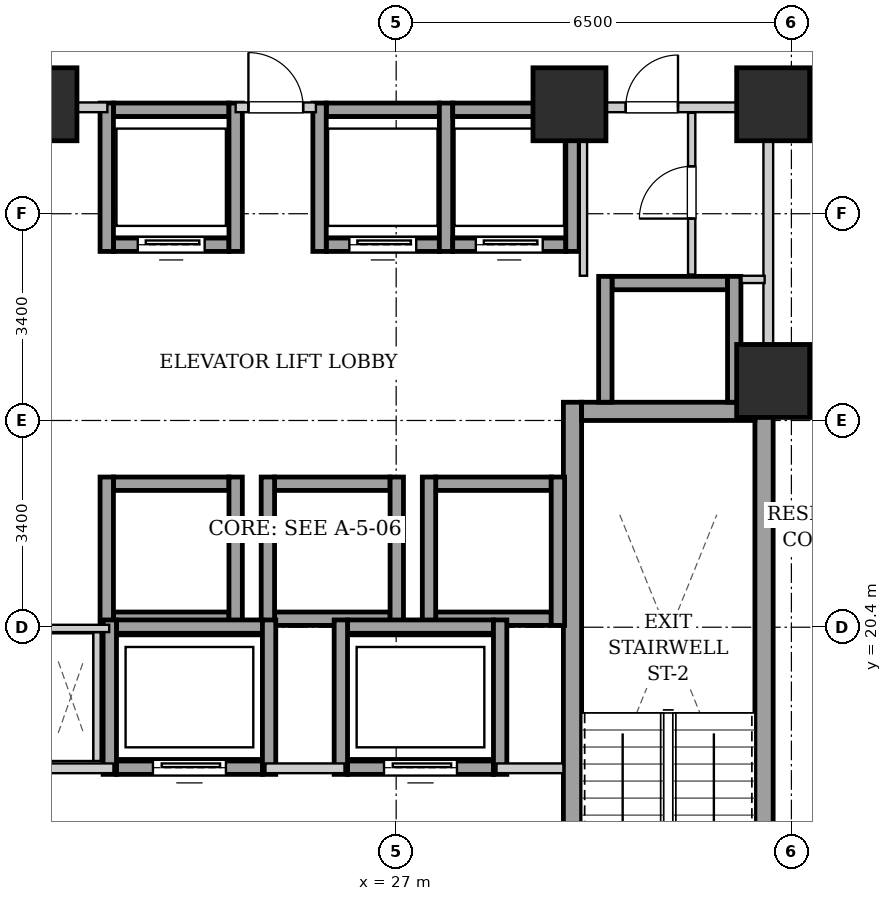
"""IFC4 building model, lengths in metres.
Left out: names, types, materials, properties, quantities, classifications, styles, units other than length and angle.
Written with IfcOpenShell. Run it as: python <this file> out.ifc"""

import sys

from ifc_helpers import new_model, si_unit, direction, frame, frame_2d, origin, origin_2d, place, context, subcontext, project, spatial, rectangle, extrude, element, fill, save


model = new_model("IFC4")
c1 = context("Model", 3, precision=1e-05, world=origin(), true_north=direction((0.0, 1.0)))
c2 = subcontext(c1, "Body", "Model", "MODEL_VIEW")
j1 = project(units=[si_unit("LENGTHUNIT", "METRE"), si_unit("PLANEANGLEUNIT", "RADIAN")], contexts=[c1])
p1 = place(None, origin())
s1 = spatial("IfcSite", under=j1, at=p1, CompositionType="ELEMENT")
p2 = place(p1, origin())
s2 = spatial("IfcBuilding", under=s1, at=p2, CompositionType="ELEMENT")
p3 = place(p2, frame((0.0, 0.0, 54.6)))
s3 = spatial("IfcBuildingStorey", under=s2, at=p3, CompositionType="ELEMENT", Elevation=54.6)
for number, where, z_axis, x_axis in (
    (1, (21.15, 29.0, 0.0), (0.0, 0.0, 1.0), (1.0, 0.0, 0.0)),
    (2, (29.85, 29.0, 0.0), (0.0, 0.0, 1.0), (1.0, 0.0, 0.0)),
    (3, (33.2, 29.0, 0.0), (0.0, 0.0, 1.0), (1.0, 0.0, 0.0)),
    (4, (33.2, 24.45, 0.0), (0.0, 0.0, 1.0), (1.0, 0.0, 0.0)),
):
    element("IfcColumn", number, at=place(p3, frame(where, z_axis=z_axis, x_axis=x_axis)), inside=s3, PredefinedType="COLUMN", context=c2, shape_type="SweptSolid", body=[
        extrude(rectangle(XDim=1.2, YDim=1.2, at=origin_2d()), origin(), (0.0, 0.0, 1.0), 3.2),
    ])
for number, where, z_axis, x_axis in (
    (5, (29.9, 15.1, 0.0), (0.0, 0.0, 1.0), (0.0, 1.0, 0.0)),
    (6, (33.05, 15.1, 0.0), (0.0, 0.0, 1.0), (0.0, 1.0, 0.0)),
):
    element("IfcWall", number, at=place(p3, frame(where, z_axis=z_axis, x_axis=x_axis)), inside=s3, PredefinedType="SHEAR", context=c2, shape_type="SweptSolid", body=[
        extrude(rectangle(XDim=9.0, YDim=0.3, at=frame_2d((4.5, 0.0))), origin(), (0.0, 0.0, 1.0), 2.94),
    ])
p4 = place(p3, frame((30.05, 23.95, 0.0), z_axis=(0.0, 0.0, 1.0), x_axis=(1.0, 0.0, 0.0)))
e7 = element("IfcWall", 7, at=p4, inside=s3, PredefinedType="SHEAR", context=c2, shape_type="SweptSolid", body=[
    extrude(rectangle(XDim=2.85, YDim=0.3, at=frame_2d((1.425, 0.0))), origin(), (0.0, 0.0, 1.0), 2.94),
])
p5 = place(p3, frame((22.35, 26.69, 0.0), z_axis=(0.0, 0.0, 1.0), x_axis=(1.0, 0.0, 0.0)))
e8 = element("IfcWall", 8, at=p5, inside=s3, PredefinedType="SHEAR", context=c2, shape_type="SweptSolid", body=[
    extrude(rectangle(XDim=1.9, YDim=0.22, at=frame_2d((0.95, 0.0))), origin(), (0.0, 0.0, 1.0), 2.94),
])
p6 = place(p5, frame((0.4, 0.0, 0.0)))
e9 = element("IfcOpeningElement", 9, at=p6, cuts=e8, PredefinedType="OPENING", context=c2, shape_type="SweptSolid", body=[
    extrude(rectangle(XDim=1.1, YDim=2.15, at=frame_2d((0.55, 1.075))), frame((0.0, 0.12, 0.0), z_axis=(0.0, -1.0, 0.0), x_axis=(1.0, 0.0, 0.0)), (0.0, 0.0, 1.0), 0.24),
])
p7 = place(p3, frame((22.35, 28.91, 0.0), z_axis=(0.0, 0.0, 1.0), x_axis=(1.0, 0.0, 0.0)))
e10 = element("IfcWall", 10, at=p7, inside=s3, PredefinedType="SHEAR", context=c2, shape_type="SweptSolid", body=[
    extrude(rectangle(XDim=1.9, YDim=0.22, at=frame_2d((0.95, 0.0))), origin(), (0.0, 0.0, 1.0), 2.94),
])
for number, where, z_axis, x_axis in (
    (11, (22.24, 26.58, 0.0), (0.0, 0.0, 1.0), (0.0, 1.0, 0.0)),
    (12, (24.36, 26.58, 0.0), (0.0, 0.0, 1.0), (0.0, 1.0, 0.0)),
):
    element("IfcWall", number, at=place(p3, frame(where, z_axis=z_axis, x_axis=x_axis)), inside=s3, PredefinedType="SHEAR", context=c2, shape_type="SweptSolid", body=[
        extrude(rectangle(XDim=2.44, YDim=0.22, at=frame_2d((1.22, 0.0))), origin(), (0.0, 0.0, 1.0), 2.94),
    ])
p8 = place(p3, frame((25.85, 26.69, 0.0), z_axis=(0.0, 0.0, 1.0), x_axis=(1.0, 0.0, 0.0)))
e13 = element("IfcWall", 13, at=p8, inside=s3, PredefinedType="SHEAR", context=c2, shape_type="SweptSolid", body=[
    extrude(rectangle(XDim=1.86, YDim=0.22, at=frame_2d((0.93, 0.0))), origin(), (0.0, 0.0, 1.0), 2.94),
])
p9 = place(p8, frame((0.38, 0.0, 0.0)))
e14 = element("IfcOpeningElement", 14, at=p9, cuts=e13, PredefinedType="OPENING", context=c2, shape_type="SweptSolid", body=[
    extrude(rectangle(XDim=1.1, YDim=2.15, at=frame_2d((0.55, 1.075))), frame((0.0, 0.12, 0.0), z_axis=(0.0, -1.0, 0.0), x_axis=(1.0, 0.0, 0.0)), (0.0, 0.0, 1.0), 0.24),
])
p10 = place(p3, frame((25.85, 28.91, 0.0), z_axis=(0.0, 0.0, 1.0), x_axis=(1.0, 0.0, 0.0)))
e15 = element("IfcWall", 15, at=p10, inside=s3, PredefinedType="SHEAR", context=c2, shape_type="SweptSolid", body=[
    extrude(rectangle(XDim=1.86, YDim=0.22, at=frame_2d((0.93, 0.0))), origin(), (0.0, 0.0, 1.0), 2.94),
])
for number, where, z_axis, x_axis in (
    (16, (25.74, 26.58, 0.0), (0.0, 0.0, 1.0), (0.0, 1.0, 0.0)),
    (17, (27.82, 26.58, 0.0), (0.0, 0.0, 1.0), (0.0, 1.0, 0.0)),
):
    element("IfcWall", number, at=place(p3, frame(where, z_axis=z_axis, x_axis=x_axis)), inside=s3, PredefinedType="SHEAR", context=c2, shape_type="SweptSolid", body=[
        extrude(rectangle(XDim=2.44, YDim=0.22, at=frame_2d((1.22, 0.0))), origin(), (0.0, 0.0, 1.0), 2.94),
    ])
p11 = place(p3, frame((27.93, 26.69, 0.0), z_axis=(0.0, 0.0, 1.0), x_axis=(1.0, 0.0, 0.0)))
e18 = element("IfcWall", 18, at=p11, inside=s3, PredefinedType="SHEAR", context=c2, shape_type="SweptSolid", body=[
    extrude(rectangle(XDim=1.86, YDim=0.22, at=frame_2d((0.93, 0.0))), origin(), (0.0, 0.0, 1.0), 2.94),
])
p12 = place(p11, frame((0.38, 0.0, 0.0)))
e19 = element("IfcOpeningElement", 19, at=p12, cuts=e18, PredefinedType="OPENING", context=c2, shape_type="SweptSolid", body=[
    extrude(rectangle(XDim=1.1, YDim=2.15, at=frame_2d((0.55, 1.075))), frame((0.0, 0.12, 0.0), z_axis=(0.0, -1.0, 0.0), x_axis=(1.0, 0.0, 0.0)), (0.0, 0.0, 1.0), 0.24),
])
p13 = place(p3, frame((27.93, 28.91, 0.0), z_axis=(0.0, 0.0, 1.0), x_axis=(1.0, 0.0, 0.0)))
e20 = element("IfcWall", 20, at=p13, inside=s3, PredefinedType="SHEAR", context=c2, shape_type="SweptSolid", body=[
    extrude(rectangle(XDim=1.86, YDim=0.22, at=frame_2d((0.93, 0.0))), origin(), (0.0, 0.0, 1.0), 2.94),
])
p14 = place(p3, frame((29.9, 26.58, 0.0), z_axis=(0.0, 0.0, 1.0), x_axis=(0.0, 1.0, 0.0)))
e21 = element("IfcWall", 21, at=p14, inside=s3, PredefinedType="SHEAR", context=c2, shape_type="SweptSolid", body=[
    extrude(rectangle(XDim=2.44, YDim=0.22, at=frame_2d((1.22, 0.0))), origin(), (0.0, 0.0, 1.0), 2.94),
])
for number, where, z_axis, x_axis in (
    (22, (22.35, 20.54, 0.0), (0.0, 0.0, 1.0), (1.0, 0.0, 0.0)),
    (23, (22.35, 22.76, 0.0), (0.0, 0.0, 1.0), (1.0, 0.0, 0.0)),
):
    element("IfcWall", number, at=place(p3, frame(where, z_axis=z_axis, x_axis=x_axis)), inside=s3, PredefinedType="SHEAR", context=c2, shape_type="SweptSolid", body=[
        extrude(rectangle(XDim=1.9, YDim=0.22, at=frame_2d((0.95, 0.0))), origin(), (0.0, 0.0, 1.0), 2.94),
    ])
for number, where, z_axis, x_axis in (
    (24, (22.24, 20.43, 0.0), (0.0, 0.0, 1.0), (0.0, 1.0, 0.0)),
    (25, (24.36, 20.43, 0.0), (0.0, 0.0, 1.0), (0.0, 1.0, 0.0)),
):
    element("IfcWall", number, at=place(p3, frame(where, z_axis=z_axis, x_axis=x_axis)), inside=s3, PredefinedType="SHEAR", context=c2, shape_type="SweptSolid", body=[
        extrude(rectangle(XDim=2.44, YDim=0.22, at=frame_2d((1.22, 0.0))), origin(), (0.0, 0.0, 1.0), 2.94),
    ])
for number, where, z_axis, x_axis in (
    (26, (25.0, 20.54, 0.0), (0.0, 0.0, 1.0), (1.0, 0.0, 0.0)),
    (27, (25.0, 22.76, 0.0), (0.0, 0.0, 1.0), (1.0, 0.0, 0.0)),
):
    element("IfcWall", number, at=place(p3, frame(where, z_axis=z_axis, x_axis=x_axis)), inside=s3, PredefinedType="SHEAR", context=c2, shape_type="SweptSolid", body=[
        extrude(rectangle(XDim=1.9, YDim=0.22, at=frame_2d((0.95, 0.0))), origin(), (0.0, 0.0, 1.0), 2.94),
    ])
for number, where, z_axis, x_axis in (
    (28, (24.89, 20.43, 0.0), (0.0, 0.0, 1.0), (0.0, 1.0, 0.0)),
    (29, (27.01, 20.43, 0.0), (0.0, 0.0, 1.0), (0.0, 1.0, 0.0)),
):
    element("IfcWall", number, at=place(p3, frame(where, z_axis=z_axis, x_axis=x_axis)), inside=s3, PredefinedType="SHEAR", context=c2, shape_type="SweptSolid", body=[
        extrude(rectangle(XDim=2.44, YDim=0.22, at=frame_2d((1.22, 0.0))), origin(), (0.0, 0.0, 1.0), 2.94),
    ])
for number, where, z_axis, x_axis in (
    (30, (27.65, 20.54, 0.0), (0.0, 0.0, 1.0), (1.0, 0.0, 0.0)),
    (31, (27.65, 22.76, 0.0), (0.0, 0.0, 1.0), (1.0, 0.0, 0.0)),
):
    element("IfcWall", number, at=place(p3, frame(where, z_axis=z_axis, x_axis=x_axis)), inside=s3, PredefinedType="SHEAR", context=c2, shape_type="SweptSolid", body=[
        extrude(rectangle(XDim=1.9, YDim=0.22, at=frame_2d((0.95, 0.0))), origin(), (0.0, 0.0, 1.0), 2.94),
    ])
for number, where, z_axis, x_axis in (
    (32, (27.54, 20.43, 0.0), (0.0, 0.0, 1.0), (0.0, 1.0, 0.0)),
    (33, (29.66, 20.43, 0.0), (0.0, 0.0, 1.0), (0.0, 1.0, 0.0)),
):
    element("IfcWall", number, at=place(p3, frame(where, z_axis=z_axis, x_axis=x_axis)), inside=s3, PredefinedType="SHEAR", context=c2, shape_type="SweptSolid", body=[
        extrude(rectangle(XDim=2.44, YDim=0.22, at=frame_2d((1.22, 0.0))), origin(), (0.0, 0.0, 1.0), 2.94),
    ])
p15 = place(p3, frame((30.55, 26.06, 0.0), z_axis=(0.0, 0.0, 1.0), x_axis=(1.0, 0.0, 0.0)))
e34 = element("IfcWall", 34, at=p15, inside=s3, PredefinedType="SHEAR", context=c2, shape_type="SweptSolid", body=[
    extrude(rectangle(XDim=1.9, YDim=0.22, at=frame_2d((0.95, 0.0))), origin(), (0.0, 0.0, 1.0), 2.94),
])
for number, where, z_axis, x_axis in (
    (35, (30.44, 24.1, 0.0), (0.0, 0.0, 1.0), (0.0, 1.0, 0.0)),
    (36, (32.56, 24.1, 0.0), (0.0, 0.0, 1.0), (0.0, 1.0, 0.0)),
):
    element("IfcWall", number, at=place(p3, frame(where, z_axis=z_axis, x_axis=x_axis)), inside=s3, PredefinedType="SHEAR", context=c2, shape_type="SweptSolid", body=[
        extrude(rectangle(XDim=2.07, YDim=0.22, at=frame_2d((1.035, 0.0))), origin(), (0.0, 0.0, 1.0), 2.94),
    ])
p16 = place(p3, frame((22.4, 18.09, 0.0), z_axis=(0.0, 0.0, 1.0), x_axis=(1.0, 0.0, 0.0)))
e37 = element("IfcWall", 37, at=p16, inside=s3, PredefinedType="SHEAR", context=c2, shape_type="SweptSolid", body=[
    extrude(rectangle(XDim=2.4, YDim=0.22, at=frame_2d((1.2, 0.0))), origin(), (0.0, 0.0, 1.0), 2.94),
])
p17 = place(p16, frame((0.6, 0.0, 0.0)))
e38 = element("IfcOpeningElement", 38, at=p17, cuts=e37, PredefinedType="OPENING", context=c2, shape_type="SweptSolid", body=[
    extrude(rectangle(XDim=1.2, YDim=2.15, at=frame_2d((0.6, 1.075))), frame((0.0, 0.12, 0.0), z_axis=(0.0, -1.0, 0.0), x_axis=(1.0, 0.0, 0.0)), (0.0, 0.0, 1.0), 0.24),
])
p18 = place(p3, frame((22.4, 20.41, 0.0), z_axis=(0.0, 0.0, 1.0), x_axis=(1.0, 0.0, 0.0)))
e39 = element("IfcWall", 39, at=p18, inside=s3, PredefinedType="SHEAR", context=c2, shape_type="SweptSolid", body=[
    extrude(rectangle(XDim=2.4, YDim=0.22, at=frame_2d((1.2, 0.0))), origin(), (0.0, 0.0, 1.0), 2.94),
])
for number, where, z_axis, x_axis in (
    (40, (22.29, 17.98, 0.0), (0.0, 0.0, 1.0), (0.0, 1.0, 0.0)),
    (41, (24.91, 17.98, 0.0), (0.0, 0.0, 1.0), (0.0, 1.0, 0.0)),
):
    element("IfcWall", number, at=place(p3, frame(where, z_axis=z_axis, x_axis=x_axis)), inside=s3, PredefinedType="SHEAR", context=c2, shape_type="SweptSolid", body=[
        extrude(rectangle(XDim=2.54, YDim=0.22, at=frame_2d((1.27, 0.0))), origin(), (0.0, 0.0, 1.0), 2.94),
    ])
p19 = place(p3, frame((26.2, 18.09, 0.0), z_axis=(0.0, 0.0, 1.0), x_axis=(1.0, 0.0, 0.0)))
e42 = element("IfcWall", 42, at=p19, inside=s3, PredefinedType="SHEAR", context=c2, shape_type="SweptSolid", body=[
    extrude(rectangle(XDim=2.4, YDim=0.22, at=frame_2d((1.2, 0.0))), origin(), (0.0, 0.0, 1.0), 2.94),
])
p20 = place(p19, frame((0.6, 0.0, 0.0)))
e43 = element("IfcOpeningElement", 43, at=p20, cuts=e42, PredefinedType="OPENING", context=c2, shape_type="SweptSolid", body=[
    extrude(rectangle(XDim=1.2, YDim=2.15, at=frame_2d((0.6, 1.075))), frame((0.0, 0.12, 0.0), z_axis=(0.0, -1.0, 0.0), x_axis=(1.0, 0.0, 0.0)), (0.0, 0.0, 1.0), 0.24),
])
p21 = place(p3, frame((26.2, 20.41, 0.0), z_axis=(0.0, 0.0, 1.0), x_axis=(1.0, 0.0, 0.0)))
e44 = element("IfcWall", 44, at=p21, inside=s3, PredefinedType="SHEAR", context=c2, shape_type="SweptSolid", body=[
    extrude(rectangle(XDim=2.4, YDim=0.22, at=frame_2d((1.2, 0.0))), origin(), (0.0, 0.0, 1.0), 2.94),
])
for number, where, z_axis, x_axis in (
    (45, (26.09, 17.98, 0.0), (0.0, 0.0, 1.0), (0.0, 1.0, 0.0)),
    (46, (28.71, 17.98, 0.0), (0.0, 0.0, 1.0), (0.0, 1.0, 0.0)),
):
    element("IfcWall", number, at=place(p3, frame(where, z_axis=z_axis, x_axis=x_axis)), inside=s3, PredefinedType="SHEAR", context=c2, shape_type="SweptSolid", body=[
        extrude(rectangle(XDim=2.54, YDim=0.22, at=frame_2d((1.27, 0.0))), origin(), (0.0, 0.0, 1.0), 2.94),
    ])
p22 = place(p3, frame((21.25, 18.08, 0.0), z_axis=(0.0, 0.0, 1.0), x_axis=(1.0, 0.0, 0.0)))
e47 = element("IfcWall", 47, at=p22, inside=s3, PredefinedType="PARTITIONING", context=c2, shape_type="SweptSolid", body=[
    extrude(rectangle(XDim=1.1, YDim=0.16, at=frame_2d((0.55, 0.0))), origin(), (0.0, 0.0, 1.0), 2.94),
])
p23 = place(p3, frame((24.85, 18.08, 0.0), z_axis=(0.0, 0.0, 1.0), x_axis=(1.0, 0.0, 0.0)))
e48 = element("IfcWall", 48, at=p23, inside=s3, PredefinedType="PARTITIONING", context=c2, shape_type="SweptSolid", body=[
    extrude(rectangle(XDim=1.3, YDim=0.16, at=frame_2d((0.65, 0.0))), origin(), (0.0, 0.0, 1.0), 2.94),
])
p24 = place(p3, frame((28.65, 18.08, 0.0), z_axis=(0.0, 0.0, 1.0), x_axis=(1.0, 0.0, 0.0)))
e49 = element("IfcWall", 49, at=p24, inside=s3, PredefinedType="PARTITIONING", context=c2, shape_type="SweptSolid", body=[
    extrude(rectangle(XDim=1.1, YDim=0.16, at=frame_2d((0.55, 0.0))), origin(), (0.0, 0.0, 1.0), 2.94),
])
p25 = place(p3, frame((33.12, 24.12, 0.0), z_axis=(0.0, 0.0, 1.0), x_axis=(0.0, 1.0, 0.0)))
e50 = element("IfcWall", 50, at=p25, inside=s3, PredefinedType="PARTITIONING", context=c2, shape_type="SweptSolid", body=[
    extrude(rectangle(XDim=4.76, YDim=0.16, at=frame_2d((2.38, 0.0))), origin(), (0.0, 0.0, 1.0), 2.94),
])
p26 = place(p3, frame((24.36, 28.95, 0.0), z_axis=(0.0, 0.0, 1.0), x_axis=(1.0, 0.0, 0.0)))
e51 = element("IfcWall", 51, at=p26, inside=s3, PredefinedType="PARTITIONING", context=c2, shape_type="SweptSolid", body=[
    extrude(rectangle(XDim=1.32, YDim=0.16, at=frame_2d((0.66, 0.0))), origin(), (0.0, 0.0, 1.0), 2.232),
])
p27 = place(p26, frame((0.21, 0.0, 0.0)))
e52 = element("IfcOpeningElement", 52, at=p27, cuts=e51, PredefinedType="OPENING", context=c2, shape_type="SweptSolid", body=[
    extrude(rectangle(XDim=0.9, YDim=2.05, at=frame_2d((0.45, 1.025))), frame((0.0, 0.09, 0.0), z_axis=(0.0, -1.0, 0.0), x_axis=(1.0, 0.0, 0.0)), (0.0, 0.0, 1.0), 0.18),
])
p28 = place(p3, frame((17.96, 28.95, 0.0), z_axis=(0.0, 0.0, 1.0), x_axis=(1.0, 0.0, 0.0)))
e53 = element("IfcWall", 53, at=p28, inside=s3, PredefinedType="PARTITIONING", context=c2, shape_type="SweptSolid", body=[
    extrude(rectangle(XDim=4.29, YDim=0.16, at=frame_2d((2.145, 0.0))), origin(), (0.0, 0.0, 1.0), 2.232),
])
p29 = place(p28, frame((1.57, 0.0, 0.0)))
e54 = element("IfcOpeningElement", 54, at=p29, cuts=e53, PredefinedType="OPENING", context=c2, shape_type="SweptSolid", body=[
    extrude(rectangle(XDim=0.86, YDim=2.05, at=frame_2d((0.43, 1.025))), frame((0.0, 0.09, 0.0), z_axis=(0.0, -1.0, 0.0), x_axis=(1.0, 0.0, 0.0)), (0.0, 0.0, 1.0), 0.18),
])
p30 = place(p3, frame((22.08, 18.2, 0.0), z_axis=(0.0, 0.0, 1.0), x_axis=(0.0, 1.0, 0.0)))
e55 = element("IfcWall", 55, at=p30, inside=s3, PredefinedType="PARTITIONING", context=c2, shape_type="SweptSolid", body=[
    extrude(rectangle(XDim=2.12, YDim=0.12, at=frame_2d((1.06, 0.0))), origin(), (0.0, 0.0, 1.0), 2.94),
])
p31 = place(p3, frame((22.28, 20.38, 0.0), z_axis=(0.0, 0.0, 1.0), x_axis=(-1.0, 0.0, 0.0)))
e56 = element("IfcWall", 56, at=p31, inside=s3, PredefinedType="PARTITIONING", context=c2, shape_type="SweptSolid", body=[
    extrude(rectangle(XDim=1.02, YDim=0.12, at=frame_2d((0.51, 0.0))), origin(), (0.0, 0.0, 1.0), 2.94),
])
p32 = place(p3, frame((30.08, 26.18, 0.0), z_axis=(0.0, 0.0, 1.0), x_axis=(0.0, 1.0, 0.0)))
e57 = element("IfcWall", 57, at=p32, inside=s3, PredefinedType="PARTITIONING", context=c2, shape_type="SweptSolid", body=[
    extrude(rectangle(XDim=2.68, YDim=0.12, at=frame_2d((1.34, 0.0))), origin(), (0.0, 0.0, 1.0), 2.94),
])
p33 = place(p3, frame((32.68, 26.12, 0.0), z_axis=(0.0, 0.0, 1.0), x_axis=(1.0, 0.0, 0.0)))
e58 = element("IfcWall", 58, at=p33, inside=s3, PredefinedType="PARTITIONING", context=c2, shape_type="SweptSolid", body=[
    extrude(rectangle(XDim=0.38, YDim=0.12, at=frame_2d((0.19, 0.0))), origin(), (0.0, 0.0, 1.0), 2.94),
])
p34 = place(p3, frame((31.86, 26.2, 0.0), z_axis=(0.0, 0.0, 1.0), x_axis=(0.0, 1.0, 0.0)))
e59 = element("IfcWall", 59, at=p34, inside=s3, PredefinedType="PARTITIONING", context=c2, shape_type="SweptSolid", body=[
    extrude(rectangle(XDim=2.66, YDim=0.12, at=frame_2d((1.33, 0.0))), origin(), (0.0, 0.0, 1.0), 2.94),
])
p35 = place(p34, frame((0.92, 0.0, 0.0)))
e60 = element("IfcOpeningElement", 60, at=p35, cuts=e59, PredefinedType="OPENING", context=c2, shape_type="SweptSolid", body=[
    extrude(rectangle(XDim=0.86, YDim=2.05, at=frame_2d((0.43, 1.025))), frame((0.0, 0.07, 0.0), z_axis=(0.0, -1.0, 0.0), x_axis=(1.0, 0.0, 0.0)), (0.0, 0.0, 1.0), 0.14),
])
p36 = place(p3, frame((30.08, 28.95, 0.0), z_axis=(0.0, 0.0, 1.0), x_axis=(1.0, 0.0, 0.0)))
e61 = element("IfcWall", 61, at=p36, inside=s3, PredefinedType="PARTITIONING", context=c2, shape_type="SweptSolid", body=[
    extrude(rectangle(XDim=2.96, YDim=0.16, at=frame_2d((1.48, 0.0))), origin(), (0.0, 0.0, 1.0), 2.94),
])
p37 = place(p36, frame((0.695, 0.0, 0.0)))
e62 = element("IfcOpeningElement", 62, at=p37, cuts=e61, PredefinedType="OPENING", context=c2, shape_type="SweptSolid", body=[
    extrude(rectangle(XDim=0.86, YDim=2.05, at=frame_2d((0.43, 1.025))), frame((0.0, 0.09, 0.0), z_axis=(0.0, -1.0, 0.0), x_axis=(1.0, 0.0, 0.0)), (0.0, 0.0, 1.0), 0.18),
])
p38 = place(p6, origin())
e63 = element("IfcDoor", 63, at=p38, inside=s3, OperationType="SLIDING_TO_LEFT", PredefinedType="DOOR", context=c2, shape_type="SweptSolid", body=[
    extrude(rectangle(XDim=1.1, YDim=2.15, at=frame_2d((0.55, 1.075))), frame((0.0, 0.025, 0.0), z_axis=(0.0, -1.0, 0.0), x_axis=(1.0, 0.0, 0.0)), (0.0, 0.0, 1.0), 0.05),
])
fill(e9, e63)
p39 = place(p9, origin())
e64 = element("IfcDoor", 64, at=p39, inside=s3, OperationType="SLIDING_TO_LEFT", PredefinedType="DOOR", context=c2, shape_type="SweptSolid", body=[
    extrude(rectangle(XDim=1.1, YDim=2.15, at=frame_2d((0.55, 1.075))), frame((0.0, 0.025, 0.0), z_axis=(0.0, -1.0, 0.0), x_axis=(1.0, 0.0, 0.0)), (0.0, 0.0, 1.0), 0.05),
])
fill(e14, e64)
p40 = place(p12, origin())
e65 = element("IfcDoor", 65, at=p40, inside=s3, OperationType="SLIDING_TO_LEFT", PredefinedType="DOOR", context=c2, shape_type="SweptSolid", body=[
    extrude(rectangle(XDim=1.1, YDim=2.15, at=frame_2d((0.55, 1.075))), frame((0.0, 0.025, 0.0), z_axis=(0.0, -1.0, 0.0), x_axis=(1.0, 0.0, 0.0)), (0.0, 0.0, 1.0), 0.05),
])
fill(e19, e65)
p41 = place(p17, origin())
e66 = element("IfcDoor", 66, at=p41, inside=s3, OperationType="SLIDING_TO_LEFT", PredefinedType="DOOR", context=c2, shape_type="SweptSolid", body=[
    extrude(rectangle(XDim=1.2, YDim=2.15, at=frame_2d((0.6, 1.075))), frame((0.0, 0.025, 0.0), z_axis=(0.0, -1.0, 0.0), x_axis=(1.0, 0.0, 0.0)), (0.0, 0.0, 1.0), 0.05),
])
fill(e38, e66)
p42 = place(p20, origin())
e67 = element("IfcDoor", 67, at=p42, inside=s3, OperationType="SLIDING_TO_LEFT", PredefinedType="DOOR", context=c2, shape_type="SweptSolid", body=[
    extrude(rectangle(XDim=1.2, YDim=2.15, at=frame_2d((0.6, 1.075))), frame((0.0, 0.025, 0.0), z_axis=(0.0, -1.0, 0.0), x_axis=(1.0, 0.0, 0.0)), (0.0, 0.0, 1.0), 0.05),
])
fill(e43, e67)
p43 = place(p27, origin())
e68 = element("IfcDoor", 68, at=p43, inside=s3, OperationType="SINGLE_SWING_LEFT", PredefinedType="DOOR", context=c2, shape_type="SweptSolid", body=[
    extrude(rectangle(XDim=0.9, YDim=2.05, at=frame_2d((0.45, 1.025))), frame((0.0, 0.025, 0.0), z_axis=(0.0, -1.0, 0.0), x_axis=(1.0, 0.0, 0.0)), (0.0, 0.0, 1.0), 0.05),
])
fill(e52, e68)
p44 = place(p35, origin())
e69 = element("IfcDoor", 69, at=p44, inside=s3, OperationType="SINGLE_SWING_LEFT", PredefinedType="DOOR", context=c2, shape_type="SweptSolid", body=[
    extrude(rectangle(XDim=0.86, YDim=2.05, at=frame_2d((0.43, 1.025))), frame((0.0, 0.025, 0.0), z_axis=(0.0, -1.0, 0.0), x_axis=(1.0, 0.0, 0.0)), (0.0, 0.0, 1.0), 0.05),
])
fill(e60, e69)
p45 = place(p37, origin())
e70 = element("IfcDoor", 70, at=p45, inside=s3, OperationType="SINGLE_SWING_RIGHT", PredefinedType="DOOR", context=c2, shape_type="SweptSolid", body=[
    extrude(rectangle(XDim=0.86, YDim=2.05, at=frame_2d((0.43, 1.025))), frame((0.0, 0.025, 0.0), z_axis=(0.0, -1.0, 0.0), x_axis=(1.0, 0.0, 0.0)), (0.0, 0.0, 1.0), 0.05),
])
fill(e62, e70)
save(model, sys.argv[1])
